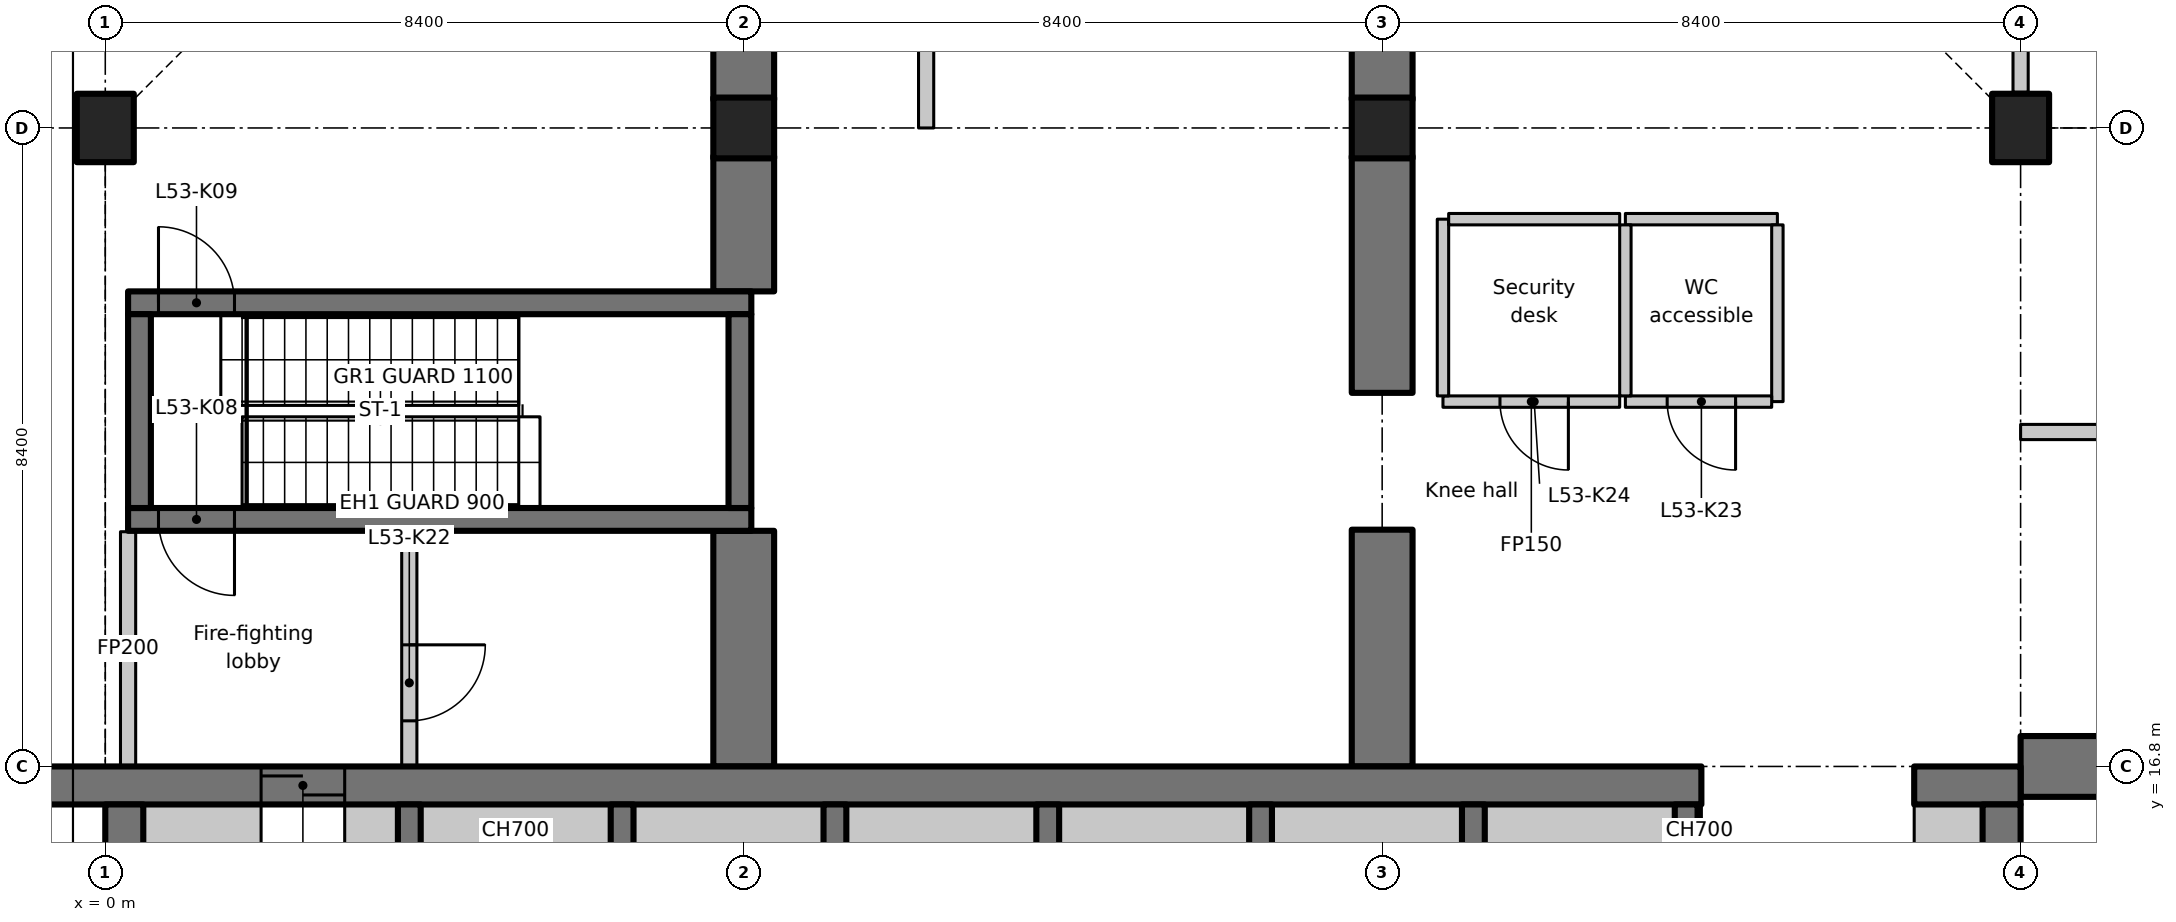
"""IFC4 building model, lengths in metres.
Left out: names, types, materials, properties, quantities, classifications, styles, units other than length and angle.
Written with IfcOpenShell. Run it as: python <this file> out.ifc"""

import sys

from ifc_helpers import new_model, si_unit, direction, frame, frame_2d, origin, origin_2d, place, context, subcontext, project, spatial, rectangle, extrude, element, fill, save


model = new_model("IFC4")
c1 = context("Model", 3, precision=1e-05, world=origin(), true_north=direction((0.0, 1.0)))
c2 = subcontext(c1, "Body", "Model", "MODEL_VIEW")
j1 = project(units=[si_unit("LENGTHUNIT", "METRE"), si_unit("PLANEANGLEUNIT", "RADIAN")], contexts=[c1])
p1 = place(None, origin())
s1 = spatial("IfcSite", under=j1, at=p1, CompositionType="ELEMENT")
p2 = place(p1, origin())
s2 = spatial("IfcBuilding", under=s1, at=p2, CompositionType="ELEMENT")
p3 = place(p2, frame((0.0, 0.0, 210.9)))
s3 = spatial("IfcBuildingStorey", under=s2, at=p3, CompositionType="ELEMENT", Elevation=210.9)
p4 = place(p3, frame((0.0, 25.2, 0.0), z_axis=(0.0, 0.0, 1.0), x_axis=(1.0, 0.0, 0.0)))
e1 = element("IfcColumn", 1, at=p4, inside=s3, PredefinedType="COLUMN", context=c2, shape_type="SweptSolid", body=[
    extrude(rectangle(XDim=0.75, YDim=0.9, at=origin_2d()), origin(), (0.0, 0.0, 1.0), 4.55),
])
for number, where, z_axis, x_axis in (
    (2, (8.4, 25.2, 0.0), (0.0, 0.0, 1.0), (1.0, 0.0, 0.0)),
    (3, (16.8, 25.2, 0.0), (0.0, 0.0, 1.0), (1.0, 0.0, 0.0)),
):
    element("IfcColumn", number, at=place(p3, frame(where, z_axis=z_axis, x_axis=x_axis)), inside=s3, PredefinedType="COLUMN", context=c2, shape_type="SweptSolid", body=[
        extrude(rectangle(XDim=0.8, YDim=0.8, at=origin_2d()), origin(), (0.0, 0.0, 1.0), 4.55),
    ])
p5 = place(p3, frame((25.2, 25.2, 0.0), z_axis=(0.0, 0.0, 1.0), x_axis=(1.0, 0.0, 0.0)))
e4 = element("IfcColumn", 4, at=p5, inside=s3, PredefinedType="COLUMN", context=c2, shape_type="SweptSolid", body=[
    extrude(rectangle(XDim=0.75, YDim=0.9, at=origin_2d()), origin(), (0.0, 0.0, 1.0), 4.55),
])
p6 = place(p3, frame((25.2, 16.8, 0.0), z_axis=(0.0, 0.0, 1.0), x_axis=(1.0, 0.0, 0.0)))
e5 = element("IfcWall", 5, at=p6, inside=s3, PredefinedType="SHEAR", context=c2, shape_type="SweptSolid", body=[
    extrude(rectangle(XDim=3.115, YDim=0.8, at=frame_2d((1.558, 0.0))), origin(), (0.0, 0.0, 1.0), 4.55),
])
p7 = place(p3, frame((8.4, 16.8, 0.0), z_axis=(0.0, 0.0, 1.0), x_axis=(0.0, 1.0, 0.0)))
e6 = element("IfcWall", 6, at=p7, inside=s3, PredefinedType="SHEAR", context=c2, shape_type="SweptSolid", body=[
    extrude(rectangle(XDim=3.1, YDim=0.8, at=frame_2d((1.55, 0.0))), origin(), (0.0, 0.0, 1.0), 4.55),
])
p8 = place(p3, frame((8.4, 23.05, 0.0), z_axis=(0.0, 0.0, 1.0), x_axis=(0.0, 1.0, 0.0)))
e7 = element("IfcWall", 7, at=p8, inside=s3, PredefinedType="SHEAR", context=c2, shape_type="SweptSolid", body=[
    extrude(rectangle(XDim=1.78, YDim=0.8, at=frame_2d((0.89, 0.0))), origin(), (0.0, 0.0, 1.0), 4.55),
])
p9 = place(p3, frame((8.4, 25.57, 0.0), z_axis=(0.0, 0.0, 1.0), x_axis=(0.0, 1.0, 0.0)))
e8 = element("IfcWall", 8, at=p9, inside=s3, PredefinedType="SHEAR", context=c2, shape_type="SweptSolid", body=[
    extrude(rectangle(XDim=2.93, YDim=0.8, at=frame_2d((1.465, 0.0))), origin(), (0.0, 0.0, 1.0), 4.55),
])
for number, where, z_axis, x_axis in (
    (9, (16.8, 16.8, 0.0), (0.0, 0.0, 1.0), (0.0, 1.0, 0.0)),
    (10, (16.8, 21.715, 0.0), (0.0, 0.0, 1.0), (0.0, 1.0, 0.0)),
):
    element("IfcWall", number, at=place(p3, frame(where, z_axis=z_axis, x_axis=x_axis)), inside=s3, PredefinedType="SHEAR", context=c2, shape_type="SweptSolid", body=[
        extrude(rectangle(XDim=3.115, YDim=0.8, at=frame_2d((1.558, 0.0))), origin(), (0.0, 0.0, 1.0), 4.55),
    ])
p10 = place(p3, frame((16.8, 25.57, 0.0), z_axis=(0.0, 0.0, 1.0), x_axis=(0.0, 1.0, 0.0)))
e11 = element("IfcWall", 11, at=p10, inside=s3, PredefinedType="SHEAR", context=c2, shape_type="SweptSolid", body=[
    extrude(rectangle(XDim=1.63, YDim=0.8, at=frame_2d((0.815, 0.0))), origin(), (0.0, 0.0, 1.0), 4.55),
])
p11 = place(p3, frame((-1.1, 16.55, 0.0), z_axis=(0.0, 0.0, 1.0), x_axis=(1.0, 0.0, 0.0)))
e12 = element("IfcWall", 12, at=p11, inside=s3, PredefinedType="SHEAR", context=c2, shape_type="SweptSolid", body=[
    extrude(rectangle(XDim=22.1, YDim=0.5, at=frame_2d((11.05, 0.0))), origin(), (0.0, 0.0, 1.0), 4.55),
])
p12 = place(p11, frame((3.15, 0.0, 0.0)))
e13 = element("IfcOpeningElement", 13, at=p12, cuts=e12, PredefinedType="OPENING", context=c2, shape_type="SweptSolid", body=[
    extrude(rectangle(XDim=1.1, YDim=2.3, at=frame_2d((0.55, 1.15))), frame((0.0, 0.26, 0.0), z_axis=(0.0, -1.0, 0.0), x_axis=(1.0, 0.0, 0.0)), (0.0, 0.0, 1.0), 0.52),
])
p13 = place(p3, frame((23.8, 16.55, 0.0), z_axis=(0.0, 0.0, 1.0), x_axis=(1.0, 0.0, 0.0)))
e14 = element("IfcWall", 14, at=p13, inside=s3, PredefinedType="SHEAR", context=c2, shape_type="SweptSolid", body=[
    extrude(rectangle(XDim=1.4, YDim=0.5, at=frame_2d((0.7, 0.0))), origin(), (0.0, 0.0, 1.0), 4.55),
])
p14 = place(p3, frame((0.25, 7.436, 0.0), z_axis=(0.0, 0.0, 1.0), x_axis=(0.0, 1.0, 0.0)))
e15 = element("IfcWall", 15, at=p14, inside=s3, PredefinedType="SHEAR", context=c2, shape_type="SweptSolid", body=[
    extrude(rectangle(XDim=8.864, YDim=0.5, at=frame_2d((4.432, 0.0))), origin(), (0.0, 0.0, 1.0), 4.55),
])
p15 = place(p3, frame((24.95, 12.6, 0.0), z_axis=(0.0, 0.0, 1.0), x_axis=(0.0, 1.0, 0.0)))
e16 = element("IfcWall", 16, at=p15, inside=s3, PredefinedType="SHEAR", context=c2, shape_type="SweptSolid", body=[
    extrude(rectangle(XDim=3.7, YDim=0.5, at=frame_2d((1.85, 0.0))), origin(), (0.0, 0.0, 1.0), 4.55),
])
p16 = place(p3, frame((0.5, 15.95, 0.0), z_axis=(0.0, 0.0, 1.0), x_axis=(1.0, 0.0, 0.0)))
e17 = element("IfcWall", 17, at=p16, inside=s3, PredefinedType="PARTITIONING", context=c2, shape_type="SweptSolid", body=[
    extrude(rectangle(XDim=1.55, YDim=0.7, at=frame_2d((0.775, 0.0))), origin(), (0.0, 0.0, 1.0), 4.55),
])
p17 = place(p3, frame((23.8, 15.95, 0.0), z_axis=(0.0, 0.0, 1.0), x_axis=(1.0, 0.0, 0.0)))
e18 = element("IfcWall", 18, at=p17, inside=s3, PredefinedType="PARTITIONING", context=c2, shape_type="SweptSolid", body=[
    extrude(rectangle(XDim=0.9, YDim=0.7, at=frame_2d((0.45, 0.0))), origin(), (0.0, 0.0, 1.0), 4.55),
])
for number, where, z_axis, x_axis in (
    (19, (4.0, 12.95, 0.0), (0.0, 0.0, 1.0), (0.0, 1.0, 0.0)),
    (20, (6.8, 12.95, 0.0), (0.0, 0.0, 1.0), (0.0, 1.0, 0.0)),
    (21, (9.6, 12.95, 0.0), (0.0, 0.0, 1.0), (0.0, 1.0, 0.0)),
    (22, (12.4, 12.95, 0.0), (0.0, 0.0, 1.0), (0.0, 1.0, 0.0)),
    (23, (15.2, 12.95, 0.0), (0.0, 0.0, 1.0), (0.0, 1.0, 0.0)),
    (24, (18.0, 12.95, 0.0), (0.0, 0.0, 1.0), (0.0, 1.0, 0.0)),
    (25, (20.8, 12.95, 0.0), (0.0, 0.0, 1.0), (0.0, 1.0, 0.0)),
):
    element("IfcWall", number, at=place(p3, frame(where, z_axis=z_axis, x_axis=x_axis)), inside=s3, PredefinedType="SHEAR", context=c2, shape_type="SweptSolid", body=[
        extrude(rectangle(XDim=3.35, YDim=0.3, at=frame_2d((1.675, 0.0))), origin(), (0.0, 0.0, 1.0), 4.55),
    ])
p18 = place(p3, frame((8.5, 20.05, 0.0), z_axis=(0.0, 0.0, 1.0), x_axis=(-1.0, 0.0, 0.0)))
e26 = element("IfcWall", 26, at=p18, inside=s3, PredefinedType="SHEAR", context=c2, shape_type="SweptSolid", body=[
    extrude(rectangle(XDim=8.2, YDim=0.3, at=frame_2d((4.1, 0.0))), origin(), (0.0, 0.0, 1.0), 4.55),
])
p19 = place(p18, frame((6.8, 0.0, 0.0)))
e27 = element("IfcOpeningElement", 27, at=p19, cuts=e26, PredefinedType="OPENING", context=c2, shape_type="SweptSolid", body=[
    extrude(rectangle(XDim=1.0, YDim=2.1, at=frame_2d((0.5, 1.05))), frame((0.0, 0.16, 0.0), z_axis=(0.0, -1.0, 0.0), x_axis=(1.0, 0.0, 0.0)), (0.0, 0.0, 1.0), 0.32),
])
p20 = place(p3, frame((0.3, 22.9, 0.0), z_axis=(0.0, 0.0, 1.0), x_axis=(1.0, 0.0, 0.0)))
e28 = element("IfcWall", 28, at=p20, inside=s3, PredefinedType="SHEAR", context=c2, shape_type="SweptSolid", body=[
    extrude(rectangle(XDim=8.2, YDim=0.3, at=frame_2d((4.1, 0.0))), origin(), (0.0, 0.0, 1.0), 4.55),
])
p21 = place(p20, frame((0.4, 0.0, 0.0)))
e29 = element("IfcOpeningElement", 29, at=p21, cuts=e28, PredefinedType="OPENING", context=c2, shape_type="SweptSolid", body=[
    extrude(rectangle(XDim=1.0, YDim=2.1, at=frame_2d((0.5, 1.05))), frame((0.0, 0.16, 0.0), z_axis=(0.0, -1.0, 0.0), x_axis=(1.0, 0.0, 0.0)), (0.0, 0.0, 1.0), 0.32),
])
for number, where, z_axis, x_axis in (
    (30, (0.45, 20.2, 0.0), (0.0, 0.0, 1.0), (0.0, 1.0, 0.0)),
    (31, (8.35, 20.2, 0.0), (0.0, 0.0, 1.0), (0.0, 1.0, 0.0)),
):
    element("IfcWall", number, at=place(p3, frame(where, z_axis=z_axis, x_axis=x_axis)), inside=s3, PredefinedType="SHEAR", context=c2, shape_type="SweptSolid", body=[
        extrude(rectangle(XDim=2.55, YDim=0.3, at=frame_2d((1.275, 0.0))), origin(), (0.0, 0.0, 1.0), 4.55),
    ])
p22 = place(p3, frame((0.3, 16.812, 0.0), z_axis=(0.0, 0.0, 1.0), x_axis=(0.0, 1.0, 0.0)))
e32 = element("IfcWall", 32, at=p22, inside=s3, PredefinedType="PARTITIONING", context=c2, shape_type="SweptSolid", body=[
    extrude(rectangle(XDim=3.076, YDim=0.2, at=frame_2d((1.538, 0.0))), origin(), (0.0, 0.0, 1.0), 4.18),
])
p23 = place(p3, frame((4.0, 19.888, 0.0), z_axis=(0.0, 0.0, 1.0), x_axis=(0.0, -1.0, 0.0)))
e33 = element("IfcWall", 33, at=p23, inside=s3, PredefinedType="PARTITIONING", context=c2, shape_type="SweptSolid", body=[
    extrude(rectangle(XDim=3.076, YDim=0.2, at=frame_2d((1.538, 0.0))), origin(), (0.0, 0.0, 1.0), 4.55),
])
p24 = place(p23, frame((1.488, 0.0, 0.0)))
e34 = element("IfcOpeningElement", 34, at=p24, cuts=e33, PredefinedType="OPENING", context=c2, shape_type="SweptSolid", body=[
    extrude(rectangle(XDim=1.0, YDim=2.1, at=frame_2d((0.5, 1.05))), frame((0.0, 0.11, 0.0), z_axis=(0.0, -1.0, 0.0), x_axis=(1.0, 0.0, 0.0)), (0.0, 0.0, 1.0), 0.22),
])
p25 = place(p3, frame((20.0, 24.0, 0.0), z_axis=(0.0, 0.0, 1.0), x_axis=(1.0, 0.0, 0.0)))
e35 = element("IfcWall", 35, at=p25, inside=s3, PredefinedType="PARTITIONING", context=c2, shape_type="SweptSolid", body=[
    extrude(rectangle(XDim=2.0, YDim=0.15, at=frame_2d((1.0, 0.0))), origin(), (0.0, 0.0, 1.0), 4.55),
])
p26 = place(p3, frame((22.0, 23.925, 0.0), z_axis=(0.0, 0.0, 1.0), x_axis=(0.0, -1.0, 0.0)))
e36 = element("IfcWall", 36, at=p26, inside=s3, PredefinedType="PARTITIONING", context=c2, shape_type="SweptSolid", body=[
    extrude(rectangle(XDim=2.325, YDim=0.15, at=frame_2d((1.163, 0.0))), origin(), (0.0, 0.0, 1.0), 4.55),
])
p27 = place(p3, frame((21.925, 21.6, 0.0), z_axis=(0.0, 0.0, 1.0), x_axis=(-1.0, 0.0, 0.0)))
e37 = element("IfcWall", 37, at=p27, inside=s3, PredefinedType="PARTITIONING", context=c2, shape_type="SweptSolid", body=[
    extrude(rectangle(XDim=1.925, YDim=0.15, at=frame_2d((0.962, 0.0))), origin(), (0.0, 0.0, 1.0), 4.55),
])
p28 = place(p27, frame((0.475, 0.0, 0.0)))
e38 = element("IfcOpeningElement", 38, at=p28, cuts=e37, PredefinedType="OPENING", context=c2, shape_type="SweptSolid", body=[
    extrude(rectangle(XDim=0.9, YDim=2.1, at=frame_2d((0.45, 1.05))), frame((0.0, 0.085, 0.0), z_axis=(0.0, -1.0, 0.0), x_axis=(1.0, 0.0, 0.0)), (0.0, 0.0, 1.0), 0.17),
])
p29 = place(p3, frame((20.0, 21.675, 0.0), z_axis=(0.0, 0.0, 1.0), x_axis=(0.0, 1.0, 0.0)))
e39 = element("IfcWall", 39, at=p29, inside=s3, PredefinedType="PARTITIONING", context=c2, shape_type="SweptSolid", body=[
    extrude(rectangle(XDim=2.25, YDim=0.15, at=frame_2d((1.125, 0.0))), origin(), (0.0, 0.0, 1.0), 4.55),
])
p30 = place(p3, frame((19.925, 21.6, 0.0), z_axis=(0.0, 0.0, 1.0), x_axis=(-1.0, 0.0, 0.0)))
e40 = element("IfcWall", 40, at=p30, inside=s3, PredefinedType="PARTITIONING", context=c2, shape_type="SweptSolid", body=[
    extrude(rectangle(XDim=2.325, YDim=0.15, at=frame_2d((1.163, 0.0))), origin(), (0.0, 0.0, 1.0), 4.55),
])
p31 = place(p30, frame((0.675, 0.0, 0.0)))
e41 = element("IfcOpeningElement", 41, at=p31, cuts=e40, PredefinedType="OPENING", context=c2, shape_type="SweptSolid", body=[
    extrude(rectangle(XDim=0.9, YDim=2.1, at=frame_2d((0.45, 1.05))), frame((0.0, 0.085, 0.0), z_axis=(0.0, -1.0, 0.0), x_axis=(1.0, 0.0, 0.0)), (0.0, 0.0, 1.0), 0.17),
])
p32 = place(p3, frame((17.6, 21.675, 0.0), z_axis=(0.0, 0.0, 1.0), x_axis=(0.0, 1.0, 0.0)))
e42 = element("IfcWall", 42, at=p32, inside=s3, PredefinedType="PARTITIONING", context=c2, shape_type="SweptSolid", body=[
    extrude(rectangle(XDim=2.325, YDim=0.15, at=frame_2d((1.163, 0.0))), origin(), (0.0, 0.0, 1.0), 4.55),
])
p33 = place(p3, frame((17.675, 24.0, 0.0), z_axis=(0.0, 0.0, 1.0), x_axis=(1.0, 0.0, 0.0)))
e43 = element("IfcWall", 43, at=p33, inside=s3, PredefinedType="PARTITIONING", context=c2, shape_type="SweptSolid", body=[
    extrude(rectangle(XDim=2.25, YDim=0.15, at=frame_2d((1.125, 0.0))), origin(), (0.0, 0.0, 1.0), 4.55),
])
p34 = place(p3, frame((3.15, 15.95, 0.0), z_axis=(0.0, 0.0, 1.0), x_axis=(1.0, 0.0, 0.0)))
e44 = element("IfcWall", 44, at=p34, inside=s3, PredefinedType="PARTITIONING", context=c2, shape_type="SweptSolid", body=[
    extrude(rectangle(XDim=0.7, YDim=0.7, at=frame_2d((0.35, 0.0))), origin(), (0.0, 0.0, 1.0), 4.55),
])
for number, where, z_axis, x_axis in (
    (45, (4.15, 15.95, 0.0), (0.0, 0.0, 1.0), (1.0, 0.0, 0.0)),
    (46, (6.95, 15.95, 0.0), (0.0, 0.0, 1.0), (1.0, 0.0, 0.0)),
    (47, (9.75, 15.95, 0.0), (0.0, 0.0, 1.0), (1.0, 0.0, 0.0)),
    (48, (12.55, 15.95, 0.0), (0.0, 0.0, 1.0), (1.0, 0.0, 0.0)),
    (49, (15.35, 15.95, 0.0), (0.0, 0.0, 1.0), (1.0, 0.0, 0.0)),
    (50, (18.15, 15.95, 0.0), (0.0, 0.0, 1.0), (1.0, 0.0, 0.0)),
):
    element("IfcWall", number, at=place(p3, frame(where, z_axis=z_axis, x_axis=x_axis)), inside=s3, PredefinedType="PARTITIONING", context=c2, shape_type="SweptSolid", body=[
        extrude(rectangle(XDim=2.5, YDim=0.7, at=frame_2d((1.25, 0.0))), origin(), (0.0, 0.0, 1.0), 4.55),
    ])
p35 = place(p3, frame((20.95, 15.95, 0.0), z_axis=(0.0, 0.0, 1.0), x_axis=(1.0, 0.0, 0.0)))
e51 = element("IfcWall", 51, at=p35, inside=s3, PredefinedType="PARTITIONING", context=c2, shape_type="SweptSolid", body=[
    extrude(rectangle(XDim=0.05, YDim=0.7, at=frame_2d((0.025, 0.0))), origin(), (0.0, 0.0, 1.0), 4.55),
])
p36 = place(p3, frame((25.2, 21.2, 0.0), z_axis=(0.0, 0.0, 1.0), x_axis=(1.0, 0.0, 0.0)))
e52 = element("IfcWall", 52, at=p36, inside=s3, PredefinedType="PARTITIONING", context=c2, shape_type="SweptSolid", body=[
    extrude(rectangle(XDim=4.2, YDim=0.2, at=frame_2d((2.1, 0.0))), origin(), (0.0, 0.0, 1.0), 4.53),
])
p37 = place(p36, frame((1.5, 0.0, 0.0)))
e53 = element("IfcOpeningElement", 53, at=p37, cuts=e52, PredefinedType="OPENING", context=c2, shape_type="SweptSolid", body=[
    extrude(rectangle(XDim=1.0, YDim=2.1, at=frame_2d((0.5, 1.05))), frame((0.0, 0.11, 0.0), z_axis=(0.0, -1.0, 0.0), x_axis=(1.0, 0.0, 0.0)), (0.0, 0.0, 1.0), 0.22),
])
p38 = place(p3, frame((25.2, 25.67, 0.0), z_axis=(0.0, 0.0, 1.0), x_axis=(0.0, 1.0, 0.0)))
e54 = element("IfcWall", 54, at=p38, inside=s3, PredefinedType="PARTITIONING", context=c2, shape_type="SweptSolid", body=[
    extrude(rectangle(XDim=4.487, YDim=0.2, at=frame_2d((2.243, 0.0))), origin(), (0.0, 0.0, 1.0), 4.18),
])
p39 = place(p3, frame((10.8, 25.2, 0.0), z_axis=(0.0, 0.0, 1.0), x_axis=(0.0, 1.0, 0.0)))
e55 = element("IfcWall", 55, at=p39, inside=s3, PredefinedType="PARTITIONING", context=c2, shape_type="SweptSolid", body=[
    extrude(rectangle(XDim=4.2, YDim=0.2, at=frame_2d((2.1, 0.0))), origin(), (0.0, 0.0, 1.0), 4.53),
])
p40 = place(p39, frame((1.5, 0.0, 0.0)))
e56 = element("IfcOpeningElement", 56, at=p40, cuts=e55, PredefinedType="OPENING", context=c2, shape_type="SweptSolid", body=[
    extrude(rectangle(XDim=1.0, YDim=2.1, at=frame_2d((0.5, 1.05))), frame((0.0, 0.11, 0.0), z_axis=(0.0, -1.0, 0.0), x_axis=(1.0, 0.0, 0.0)), (0.0, 0.0, 1.0), 0.22),
])
p41 = place(p12, origin())
e57 = element("IfcDoor", 57, at=p41, inside=s3, OperationType="SLIDING_TO_LEFT", PredefinedType="DOOR", context=c2, shape_type="SweptSolid", body=[
    extrude(rectangle(XDim=1.1, YDim=2.3, at=frame_2d((0.55, 1.15))), frame((0.0, 0.025, 0.0), z_axis=(0.0, -1.0, 0.0), x_axis=(1.0, 0.0, 0.0)), (0.0, 0.0, 1.0), 0.05),
])
fill(e13, e57)
p42 = place(p19, origin())
e58 = element("IfcDoor", 58, at=p42, inside=s3, OperationType="SINGLE_SWING_RIGHT", PredefinedType="DOOR", context=c2, shape_type="SweptSolid", body=[
    extrude(rectangle(XDim=1.0, YDim=2.1, at=frame_2d((0.5, 1.05))), frame((0.0, 0.025, 0.0), z_axis=(0.0, -1.0, 0.0), x_axis=(1.0, 0.0, 0.0)), (0.0, 0.0, 1.0), 0.05),
])
fill(e27, e58)
p43 = place(p21, origin())
e59 = element("IfcDoor", 59, at=p43, inside=s3, OperationType="SINGLE_SWING_LEFT", PredefinedType="DOOR", context=c2, shape_type="SweptSolid", body=[
    extrude(rectangle(XDim=1.0, YDim=2.1, at=frame_2d((0.5, 1.05))), frame((0.0, 0.025, 0.0), z_axis=(0.0, -1.0, 0.0), x_axis=(1.0, 0.0, 0.0)), (0.0, 0.0, 1.0), 0.05),
])
fill(e29, e59)
p44 = place(p24, origin())
e60 = element("IfcDoor", 60, at=p44, inside=s3, OperationType="SINGLE_SWING_RIGHT", PredefinedType="DOOR", context=c2, shape_type="SweptSolid", body=[
    extrude(rectangle(XDim=1.0, YDim=2.1, at=frame_2d((0.5, 1.05))), frame((0.0, 0.025, 0.0), z_axis=(0.0, -1.0, 0.0), x_axis=(1.0, 0.0, 0.0)), (0.0, 0.0, 1.0), 0.05),
])
fill(e34, e60)
p45 = place(p28, origin())
e61 = element("IfcDoor", 61, at=p45, inside=s3, OperationType="SINGLE_SWING_LEFT", PredefinedType="DOOR", context=c2, shape_type="SweptSolid", body=[
    extrude(rectangle(XDim=0.9, YDim=2.1, at=frame_2d((0.45, 1.05))), frame((0.0, 0.025, 0.0), z_axis=(0.0, -1.0, 0.0), x_axis=(1.0, 0.0, 0.0)), (0.0, 0.0, 1.0), 0.05),
])
fill(e38, e61)
p46 = place(p31, origin())
e62 = element("IfcDoor", 62, at=p46, inside=s3, OperationType="SINGLE_SWING_RIGHT", PredefinedType="DOOR", context=c2, shape_type="SweptSolid", body=[
    extrude(rectangle(XDim=0.9, YDim=2.1, at=frame_2d((0.45, 1.05))), frame((0.0, 0.025, 0.0), z_axis=(0.0, -1.0, 0.0), x_axis=(1.0, 0.0, 0.0)), (0.0, 0.0, 1.0), 0.05),
])
fill(e41, e62)
save(model, sys.argv[1])
